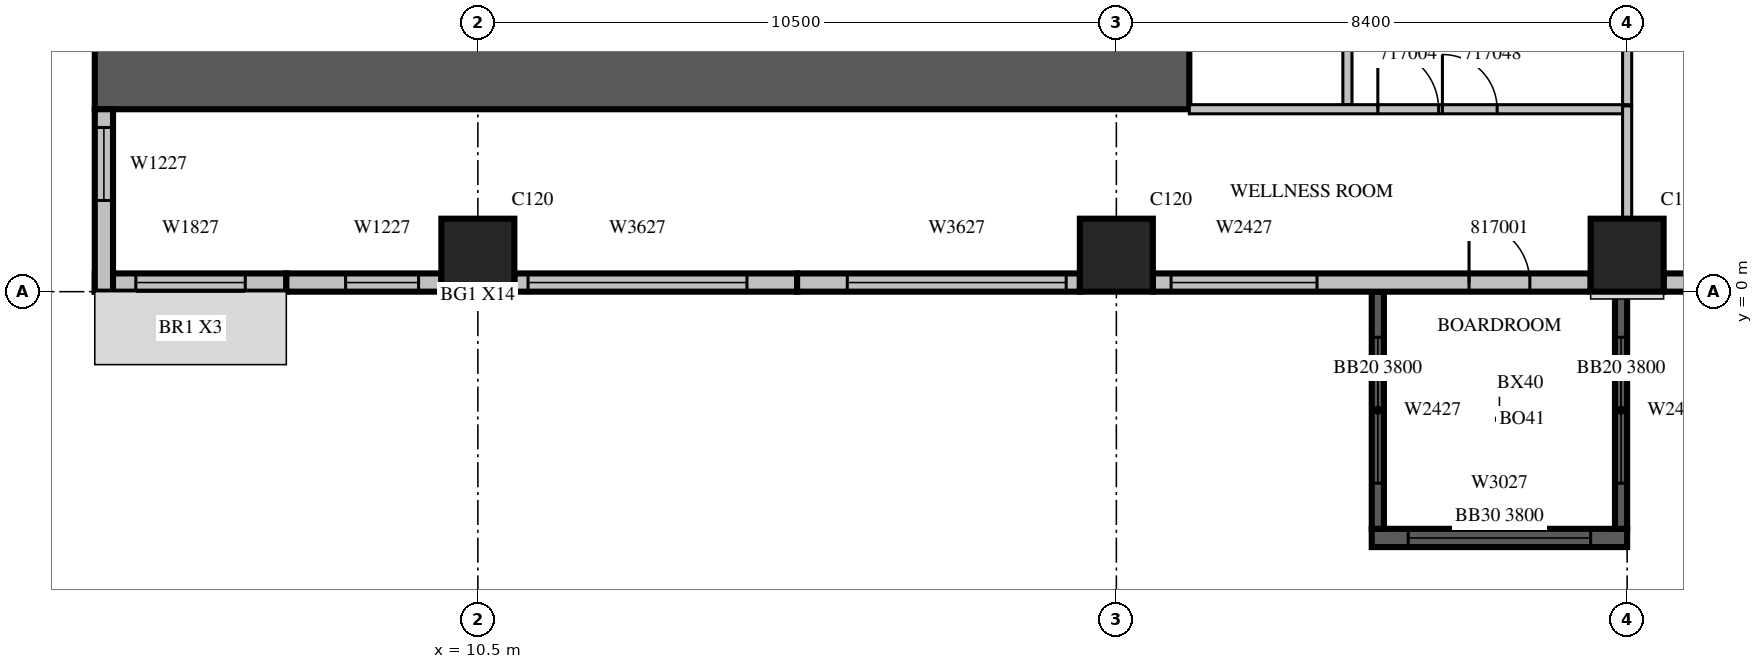
"""IFC4 building model, lengths in metres.
Left out: names, types, materials, properties, quantities, classifications, styles, units other than length and angle.
Written with IfcOpenShell. Run it as: python <this file> out.ifc"""

import sys

from ifc_helpers import new_model, si_unit, direction, frame, frame_2d, origin, origin_2d, place, context, subcontext, project, spatial, rectangle, extrude, source, transform, mapped, element, fill, save


model = new_model("IFC4")
c1 = context("Model", 3, precision=1e-05, world=origin(), true_north=direction((0.0, 1.0)))
c2 = subcontext(c1, "Body", "Model", "MODEL_VIEW")
j1 = project(units=[si_unit("LENGTHUNIT", "METRE"), si_unit("PLANEANGLEUNIT", "RADIAN")], contexts=[c1])
p1 = place(None, origin())
s1 = spatial("IfcSite", under=j1, at=p1, CompositionType="ELEMENT")
p2 = place(p1, origin())
s2 = spatial("IfcBuilding", under=s1, at=p2, CompositionType="ELEMENT")
p3 = place(p2, frame((0.0, 0.0, 82.5)))
s3 = spatial("IfcBuildingStorey", under=s2, at=p3, CompositionType="ELEMENT", Elevation=82.5)
m1 = source(origin(), c2, "Body", "SweptSolid", [
    extrude(rectangle(XDim=1.2, YDim=1.2, at=origin_2d()), origin(), (0.0, 0.0, 1.0), 4.2),
])
for number, where, z_axis, x_axis in (
    (1, (10.5, 0.6, 0.0), (0.0, 0.0, 1.0), (1.0, 0.0, 0.0)),
    (2, (21.0, 0.6, 0.0), (0.0, 0.0, 1.0), (1.0, 0.0, 0.0)),
    (3, (29.4, 0.6, 0.0), (0.0, 0.0, 1.0), (1.0, 0.0, 0.0)),
):
    element("IfcColumn", number, at=place(p3, frame(where, z_axis=z_axis, x_axis=x_axis)), inside=s3, PredefinedType="COLUMN", context=c2, shape_type="MappedRepresentation", body=[
        mapped(m1, transform((0.0, 0.0, 0.0), scale=1.0)),
    ])
m2 = source(origin(), c2, "Body", "SweptSolid", [
    extrude(rectangle(XDim=18.0, YDim=1.2, at=frame_2d((9.0, 0.0))), origin(), (0.0, 0.0, 1.0), 4.2),
])
p4 = place(p3, frame((4.2, 3.6, 0.0), z_axis=(0.0, 0.0, 1.0), x_axis=(1.0, 0.0, 0.0)))
e4 = element("IfcWall", 4, at=p4, inside=s3, PredefinedType="SHEAR", context=c2, shape_type="MappedRepresentation", body=[
    mapped(m2, transform((0.0, 0.0, 0.0), scale=1.0)),
])
m3 = source(origin(), c2, "Body", "SweptSolid", [
    extrude(rectangle(XDim=4.2, YDim=0.3, at=frame_2d((2.1, 0.0))), origin(), (0.0, 0.0, 1.0), 3.8),
])
p5 = place(p3, frame((25.2, -4.05, 0.0), z_axis=(0.0, 0.0, 1.0), x_axis=(1.0, 0.0, 0.0)))
e5 = element("IfcWall", 5, at=p5, inside=s3, PredefinedType="SOLIDWALL", context=c2, shape_type="MappedRepresentation", body=[
    mapped(m3, transform((0.0, 0.0, 0.0), scale=1.0)),
])
m4 = source(origin(), c2, "Body", "SweptSolid", [
    extrude(rectangle(XDim=3.0, YDim=2.7, at=frame_2d((1.5, 1.35))), frame((0.0, 0.16, 0.0), z_axis=(0.0, -1.0, 0.0), x_axis=(1.0, 0.0, 0.0)), (0.0, 0.0, 1.0), 0.32),
])
p6 = place(p5, frame((0.6, 0.0, 0.6)))
e6 = element("IfcOpeningElement", 6, at=p6, cuts=e5, PredefinedType="OPENING", context=c2, shape_type="MappedRepresentation", body=[
    mapped(m4, transform((0.0, 0.0, 0.0), scale=1.0)),
])
m5 = source(origin(), c2, "Body", "SweptSolid", [
    extrude(rectangle(XDim=3.9, YDim=0.2, at=frame_2d((1.95, 0.0))), origin(), (0.0, 0.0, 1.0), 3.8),
])
p7 = place(p3, frame((25.3, 0.0, 0.0), z_axis=(0.0, 0.0, 1.0), x_axis=(0.0, -1.0, 0.0)))
e7 = element("IfcWall", 7, at=p7, inside=s3, PredefinedType="SOLIDWALL", context=c2, shape_type="MappedRepresentation", body=[
    mapped(m5, transform((0.0, 0.0, 0.0), scale=1.0)),
])
m6 = source(origin(), c2, "Body", "SweptSolid", [
    extrude(rectangle(XDim=2.4, YDim=2.7, at=frame_2d((1.2, 1.35))), frame((0.0, 0.11, 0.0), z_axis=(0.0, -1.0, 0.0), x_axis=(1.0, 0.0, 0.0)), (0.0, 0.0, 1.0), 0.22),
])
p8 = place(p7, frame((0.75, 0.0, 0.6)))
e8 = element("IfcOpeningElement", 8, at=p8, cuts=e7, PredefinedType="OPENING", context=c2, shape_type="MappedRepresentation", body=[
    mapped(m6, transform((0.0, 0.0, 0.0), scale=1.0)),
])
p9 = place(p3, frame((29.3, 0.0, 0.0), z_axis=(0.0, 0.0, 1.0), x_axis=(0.0, -1.0, 0.0)))
e9 = element("IfcWall", 9, at=p9, inside=s3, PredefinedType="SOLIDWALL", context=c2, shape_type="MappedRepresentation", body=[
    mapped(m5, transform((0.0, 0.0, 0.0), scale=1.0)),
])
p10 = place(p9, frame((0.75, 0.0, 0.6)))
e10 = element("IfcOpeningElement", 10, at=p10, cuts=e9, PredefinedType="OPENING", context=c2, shape_type="MappedRepresentation", body=[
    mapped(m6, transform((0.0, 0.0, 0.0), scale=1.0)),
])
m7 = source(origin(), c2, "Body", "SweptSolid", [
    extrude(rectangle(XDim=3.15, YDim=0.3, at=frame_2d((1.575, 0.0))), origin(), (0.0, 0.0, 1.0), 3.8),
])
p11 = place(p3, frame((4.2, 0.15, 0.0), z_axis=(0.0, 0.0, 1.0), x_axis=(1.0, 0.0, 0.0)))
e11 = element("IfcWall", 11, at=p11, inside=s3, PredefinedType="STANDARD", context=c2, shape_type="MappedRepresentation", body=[
    mapped(m7, transform((0.0, 0.0, 0.0), scale=1.0)),
])
m8 = source(origin(), c2, "Body", "SweptSolid", [
    extrude(rectangle(XDim=1.8, YDim=2.7, at=frame_2d((0.9, 1.35))), frame((0.0, 0.16, 0.0), z_axis=(0.0, -1.0, 0.0), x_axis=(1.0, 0.0, 0.0)), (0.0, 0.0, 1.0), 0.32),
])
p12 = place(p11, frame((0.675, 0.0, 0.6)))
e12 = element("IfcOpeningElement", 12, at=p12, cuts=e11, PredefinedType="OPENING", context=c2, shape_type="MappedRepresentation", body=[
    mapped(m8, transform((0.0, 0.0, 0.0), scale=1.0)),
])
m9 = source(origin(), c2, "Body", "SweptSolid", [
    extrude(rectangle(XDim=2.55, YDim=0.3, at=frame_2d((1.275, 0.0))), origin(), (0.0, 0.0, 1.0), 3.8),
])
p13 = place(p3, frame((7.35, 0.15, 0.0), z_axis=(0.0, 0.0, 1.0), x_axis=(1.0, 0.0, 0.0)))
e13 = element("IfcWall", 13, at=p13, inside=s3, PredefinedType="STANDARD", context=c2, shape_type="MappedRepresentation", body=[
    mapped(m9, transform((0.0, 0.0, 0.0), scale=1.0)),
])
m10 = source(origin(), c2, "Body", "SweptSolid", [
    extrude(rectangle(XDim=1.2, YDim=2.7, at=frame_2d((0.6, 1.35))), frame((0.0, 0.16, 0.0), z_axis=(0.0, -1.0, 0.0), x_axis=(1.0, 0.0, 0.0)), (0.0, 0.0, 1.0), 0.32),
])
p14 = place(p13, frame((0.975, 0.0, 0.6)))
e14 = element("IfcOpeningElement", 14, at=p14, cuts=e13, PredefinedType="OPENING", context=c2, shape_type="MappedRepresentation", body=[
    mapped(m10, transform((0.0, 0.0, 0.0), scale=1.0)),
])
m11 = source(origin(), c2, "Body", "SweptSolid", [
    extrude(rectangle(XDim=4.65, YDim=0.3, at=frame_2d((2.325, 0.0))), origin(), (0.0, 0.0, 1.0), 3.8),
])
p15 = place(p3, frame((11.1, 0.15, 0.0), z_axis=(0.0, 0.0, 1.0), x_axis=(1.0, 0.0, 0.0)))
e15 = element("IfcWall", 15, at=p15, inside=s3, PredefinedType="STANDARD", context=c2, shape_type="MappedRepresentation", body=[
    mapped(m11, transform((0.0, 0.0, 0.0), scale=1.0)),
])
m12 = source(origin(), c2, "Body", "SweptSolid", [
    extrude(rectangle(XDim=3.6, YDim=2.7, at=frame_2d((1.8, 1.35))), frame((0.0, 0.16, 0.0), z_axis=(0.0, -1.0, 0.0), x_axis=(1.0, 0.0, 0.0)), (0.0, 0.0, 1.0), 0.32),
])
p16 = place(p15, frame((0.225, 0.0, 0.6)))
e16 = element("IfcOpeningElement", 16, at=p16, cuts=e15, PredefinedType="OPENING", context=c2, shape_type="MappedRepresentation", body=[
    mapped(m12, transform((0.0, 0.0, 0.0), scale=1.0)),
])
p17 = place(p3, frame((15.75, 0.15, 0.0), z_axis=(0.0, 0.0, 1.0), x_axis=(1.0, 0.0, 0.0)))
e17 = element("IfcWall", 17, at=p17, inside=s3, PredefinedType="STANDARD", context=c2, shape_type="MappedRepresentation", body=[
    mapped(m11, transform((0.0, 0.0, 0.0), scale=1.0)),
])
p18 = place(p17, frame((0.825, 0.0, 0.6)))
e18 = element("IfcOpeningElement", 18, at=p18, cuts=e17, PredefinedType="OPENING", context=c2, shape_type="MappedRepresentation", body=[
    mapped(m12, transform((0.0, 0.0, 0.0), scale=1.0)),
])
m13 = source(origin(), c2, "Body", "SweptSolid", [
    extrude(rectangle(XDim=7.2, YDim=0.3, at=frame_2d((3.6, 0.0))), origin(), (0.0, 0.0, 1.0), 3.8),
])
p19 = place(p3, frame((21.6, 0.15, 0.0), z_axis=(0.0, 0.0, 1.0), x_axis=(1.0, 0.0, 0.0)))
e19 = element("IfcWall", 19, at=p19, inside=s3, PredefinedType="STANDARD", context=c2, shape_type="MappedRepresentation", body=[
    mapped(m13, transform((0.0, 0.0, 0.0), scale=1.0)),
])
m14 = source(origin(), c2, "Body", "SweptSolid", [
    extrude(rectangle(XDim=2.4, YDim=2.7, at=frame_2d((1.2, 1.35))), frame((0.0, 0.16, 0.0), z_axis=(0.0, -1.0, 0.0), x_axis=(1.0, 0.0, 0.0)), (0.0, 0.0, 1.0), 0.32),
])
p20 = place(p19, frame((0.3, 0.0, 0.6)))
e20 = element("IfcOpeningElement", 20, at=p20, cuts=e19, PredefinedType="OPENING", context=c2, shape_type="MappedRepresentation", body=[
    mapped(m14, transform((0.0, 0.0, 0.0), scale=1.0)),
])
m15 = source(origin(), c2, "Body", "SweptSolid", [
    extrude(rectangle(XDim=1.0, YDim=2.1, at=frame_2d((0.5, 1.05))), frame((0.0, 0.16, 0.0), z_axis=(0.0, -1.0, 0.0), x_axis=(1.0, 0.0, 0.0)), (0.0, 0.0, 1.0), 0.32),
])
p21 = place(p19, frame((5.2, 0.0, 0.0)))
e21 = element("IfcOpeningElement", 21, at=p21, cuts=e19, PredefinedType="OPENING", context=c2, shape_type="MappedRepresentation", body=[
    mapped(m15, transform((0.0, 0.0, 0.0), scale=1.0)),
])
p22 = place(p3, frame((30.0, 0.15, 0.0), z_axis=(0.0, 0.0, 1.0), x_axis=(1.0, 0.0, 0.0)))
e22 = element("IfcWall", 22, at=p22, inside=s3, PredefinedType="STANDARD", context=c2, shape_type="MappedRepresentation", body=[
    mapped(m13, transform((0.0, 0.0, 0.0), scale=1.0)),
])
p23 = place(p22, frame((2.5, 0.0, 0.6)))
e23 = element("IfcOpeningElement", 23, at=p23, cuts=e22, PredefinedType="OPENING", context=c2, shape_type="MappedRepresentation", body=[
    mapped(m14, transform((0.0, 0.0, 0.0), scale=1.0)),
])
m16 = source(origin(), c2, "Body", "SweptSolid", [
    extrude(rectangle(XDim=3.0, YDim=0.3, at=frame_2d((1.5, 0.0))), origin(), (0.0, 0.0, 1.0), 3.8),
])
p24 = place(p3, frame((4.35, 3.0, 0.0), z_axis=(0.0, 0.0, 1.0), x_axis=(0.0, -1.0, 0.0)))
e24 = element("IfcWall", 24, at=p24, inside=s3, PredefinedType="STANDARD", context=c2, shape_type="MappedRepresentation", body=[
    mapped(m16, transform((0.0, 0.0, 0.0), scale=1.0)),
])
p25 = place(p24, frame((0.3, 0.0, 0.6)))
e25 = element("IfcOpeningElement", 25, at=p25, cuts=e24, PredefinedType="OPENING", context=c2, shape_type="MappedRepresentation", body=[
    mapped(m10, transform((0.0, 0.0, 0.0), scale=1.0)),
])
m17 = source(origin(), c2, "Body", "SweptSolid", [
    extrude(rectangle(XDim=11.625, YDim=0.15, at=frame_2d((5.812, 0.0))), origin(), (0.0, 0.0, 1.0), 3.8),
])
p26 = place(p3, frame((24.8, 14.7, 0.0), z_axis=(0.0, 0.0, 1.0), x_axis=(0.0, -1.0, 0.0)))
e26 = element("IfcWall", 26, at=p26, inside=s3, PredefinedType="PARTITIONING", context=c2, shape_type="MappedRepresentation", body=[
    mapped(m17, transform((0.0, 0.0, 0.0), scale=1.0)),
])
m18 = source(origin(), c2, "Body", "SweptSolid", [
    extrude(rectangle(XDim=0.9, YDim=2.1, at=frame_2d((0.45, 1.05))), frame((0.0, 0.085, 0.0), z_axis=(0.0, -1.0, 0.0), x_axis=(1.0, 0.0, 0.0)), (0.0, 0.0, 1.0), 0.17),
])
p27 = place(p26, frame((9.262, 0.0, 0.0)))
e27 = element("IfcOpeningElement", 27, at=p27, cuts=e26, PredefinedType="OPENING", context=c2, shape_type="MappedRepresentation", body=[
    mapped(m18, transform((0.0, 0.0, 0.0), scale=1.0)),
])
p28 = place(p26, frame((2.575, 0.0, 0.0)))
e28 = element("IfcOpeningElement", 28, at=p28, cuts=e26, PredefinedType="OPENING", context=c2, shape_type="MappedRepresentation", body=[
    mapped(m18, transform((0.0, 0.0, 0.0), scale=1.0)),
])
m19 = source(origin(), c2, "Body", "SweptSolid", [
    extrude(rectangle(XDim=6.826, YDim=0.15, at=frame_2d((3.413, 0.0))), origin(), (0.0, 0.0, 1.0), 3.8),
])
p29 = place(p3, frame((29.4, 3.075, 0.0), z_axis=(0.0, 0.0, 1.0), x_axis=(0.0, 1.0, 0.0)))
e29 = element("IfcWall", 29, at=p29, inside=s3, PredefinedType="PARTITIONING", context=c2, shape_type="MappedRepresentation", body=[
    mapped(m19, transform((0.0, 0.0, 0.0), scale=1.0)),
])
m20 = source(origin(), c2, "Body", "SweptSolid", [
    extrude(rectangle(XDim=7.125, YDim=0.15, at=frame_2d((3.562, 0.0))), origin(), (0.0, 0.0, 1.0), 3.8),
])
p30 = place(p3, frame((22.2, 3.0, 0.0), z_axis=(0.0, 0.0, 1.0), x_axis=(1.0, 0.0, 0.0)))
e30 = element("IfcWall", 30, at=p30, inside=s3, PredefinedType="PARTITIONING", context=c2, shape_type="MappedRepresentation", body=[
    mapped(m20, transform((0.0, 0.0, 0.0), scale=1.0)),
])
m21 = source(origin(), c2, "Body", "SweptSolid", [
    extrude(rectangle(XDim=1.0, YDim=2.1, at=frame_2d((0.5, 1.05))), frame((0.0, 0.085, 0.0), z_axis=(0.0, -1.0, 0.0), x_axis=(1.0, 0.0, 0.0)), (0.0, 0.0, 1.0), 0.17),
])
p31 = place(p30, frame((3.1, 0.0, 0.0)))
e31 = element("IfcOpeningElement", 31, at=p31, cuts=e30, PredefinedType="OPENING", context=c2, shape_type="MappedRepresentation", body=[
    mapped(m21, transform((0.0, 0.0, 0.0), scale=1.0)),
])
p32 = place(p30, frame((4.162, 0.0, 0.0)))
e32 = element("IfcOpeningElement", 32, at=p32, cuts=e30, PredefinedType="OPENING", context=c2, shape_type="MappedRepresentation", body=[
    mapped(m18, transform((0.0, 0.0, 0.0), scale=1.0)),
])
m22 = source(origin(), c2, "Body", "SweptSolid", [
    extrude(rectangle(XDim=1.856, YDim=0.15, at=frame_2d((0.928, 0.0))), origin(), (0.0, 0.0, 1.0), 3.8),
])
p33 = place(p3, frame((29.4, 1.199, 0.0), z_axis=(0.0, 0.0, 1.0), x_axis=(0.0, 1.0, 0.0)))
e33 = element("IfcWall", 33, at=p33, inside=s3, PredefinedType="PARTITIONING", context=c2, shape_type="MappedRepresentation", body=[
    mapped(m22, transform((0.0, 0.0, 0.0), scale=1.0)),
])
m23 = source(origin(), c2, "Body", "SweptSolid", [
    extrude(rectangle(XDim=3.0, YDim=2.7, at=frame_2d((1.5, 1.35))), frame((0.0, 0.03, 0.0), z_axis=(0.0, -1.0, 0.0), x_axis=(1.0, 0.0, 0.0)), (0.0, 0.0, 1.0), 0.06),
])
p34 = place(p6, origin())
e34 = element("IfcWindow", 34, at=p34, inside=s3, PartitioningType="SINGLE_PANEL", PredefinedType="WINDOW", context=c2, shape_type="MappedRepresentation", body=[
    mapped(m23, transform((0.0, 0.0, 0.0), scale=1.0)),
])
fill(e6, e34)
m24 = source(origin(), c2, "Body", "SweptSolid", [
    extrude(rectangle(XDim=2.4, YDim=2.7, at=frame_2d((1.2, 1.35))), frame((0.0, 0.03, 0.0), z_axis=(0.0, -1.0, 0.0), x_axis=(1.0, 0.0, 0.0)), (0.0, 0.0, 1.0), 0.06),
])
p35 = place(p8, origin())
e35 = element("IfcWindow", 35, at=p35, inside=s3, PartitioningType="SINGLE_PANEL", PredefinedType="WINDOW", context=c2, shape_type="MappedRepresentation", body=[
    mapped(m24, transform((0.0, 0.0, 0.0), scale=1.0)),
])
fill(e8, e35)
p36 = place(p10, origin())
e36 = element("IfcWindow", 36, at=p36, inside=s3, PartitioningType="SINGLE_PANEL", PredefinedType="WINDOW", context=c2, shape_type="MappedRepresentation", body=[
    mapped(m24, transform((0.0, 0.0, 0.0), scale=1.0)),
])
fill(e10, e36)
m25 = source(origin(), c2, "Body", "SweptSolid", [
    extrude(rectangle(XDim=1.8, YDim=2.7, at=frame_2d((0.9, 1.35))), frame((0.0, 0.03, 0.0), z_axis=(0.0, -1.0, 0.0), x_axis=(1.0, 0.0, 0.0)), (0.0, 0.0, 1.0), 0.06),
])
p37 = place(p12, origin())
e37 = element("IfcWindow", 37, at=p37, inside=s3, PartitioningType="SINGLE_PANEL", PredefinedType="WINDOW", context=c2, shape_type="MappedRepresentation", body=[
    mapped(m25, transform((0.0, 0.0, 0.0), scale=1.0)),
])
fill(e12, e37)
m26 = source(origin(), c2, "Body", "SweptSolid", [
    extrude(rectangle(XDim=1.2, YDim=2.7, at=frame_2d((0.6, 1.35))), frame((0.0, 0.03, 0.0), z_axis=(0.0, -1.0, 0.0), x_axis=(1.0, 0.0, 0.0)), (0.0, 0.0, 1.0), 0.06),
])
p38 = place(p14, origin())
e38 = element("IfcWindow", 38, at=p38, inside=s3, PartitioningType="SINGLE_PANEL", PredefinedType="WINDOW", context=c2, shape_type="MappedRepresentation", body=[
    mapped(m26, transform((0.0, 0.0, 0.0), scale=1.0)),
])
fill(e14, e38)
m27 = source(origin(), c2, "Body", "SweptSolid", [
    extrude(rectangle(XDim=3.6, YDim=2.7, at=frame_2d((1.8, 1.35))), frame((0.0, 0.03, 0.0), z_axis=(0.0, -1.0, 0.0), x_axis=(1.0, 0.0, 0.0)), (0.0, 0.0, 1.0), 0.06),
])
p39 = place(p16, origin())
e39 = element("IfcWindow", 39, at=p39, inside=s3, PartitioningType="SINGLE_PANEL", PredefinedType="WINDOW", context=c2, shape_type="MappedRepresentation", body=[
    mapped(m27, transform((0.0, 0.0, 0.0), scale=1.0)),
])
fill(e16, e39)
p40 = place(p18, origin())
e40 = element("IfcWindow", 40, at=p40, inside=s3, PartitioningType="SINGLE_PANEL", PredefinedType="WINDOW", context=c2, shape_type="MappedRepresentation", body=[
    mapped(m27, transform((0.0, 0.0, 0.0), scale=1.0)),
])
fill(e18, e40)
p41 = place(p20, origin())
e41 = element("IfcWindow", 41, at=p41, inside=s3, PartitioningType="SINGLE_PANEL", PredefinedType="WINDOW", context=c2, shape_type="MappedRepresentation", body=[
    mapped(m24, transform((0.0, 0.0, 0.0), scale=1.0)),
])
fill(e20, e41)
p42 = place(p25, origin())
e42 = element("IfcWindow", 42, at=p42, inside=s3, PartitioningType="SINGLE_PANEL", PredefinedType="WINDOW", context=c2, shape_type="MappedRepresentation", body=[
    mapped(m26, transform((0.0, 0.0, 0.0), scale=1.0)),
])
fill(e25, e42)
m28 = source(origin(), c2, "Body", "SweptSolid", [
    extrude(rectangle(XDim=1.0, YDim=2.1, at=frame_2d((0.5, 1.05))), frame((0.0, 0.025, 0.0), z_axis=(0.0, -1.0, 0.0), x_axis=(1.0, 0.0, 0.0)), (0.0, 0.0, 1.0), 0.05),
])
p43 = place(p31, origin())
e43 = element("IfcDoor", 43, at=p43, inside=s3, OperationType="SINGLE_SWING_LEFT", PredefinedType="DOOR", context=c2, shape_type="MappedRepresentation", body=[
    mapped(m28, transform((0.0, 0.0, 0.0), scale=1.0)),
])
fill(e31, e43)
m29 = source(origin(), c2, "Body", "SweptSolid", [
    extrude(rectangle(XDim=0.9, YDim=2.1, at=frame_2d((0.45, 1.05))), frame((0.0, 0.025, 0.0), z_axis=(0.0, -1.0, 0.0), x_axis=(1.0, 0.0, 0.0)), (0.0, 0.0, 1.0), 0.05),
])
p44 = place(p32, origin())
e44 = element("IfcDoor", 44, at=p44, inside=s3, OperationType="SINGLE_SWING_LEFT", PredefinedType="DOOR", context=c2, shape_type="MappedRepresentation", body=[
    mapped(m29, transform((0.0, 0.0, 0.0), scale=1.0)),
])
fill(e32, e44)
p45 = place(p21, origin())
e45 = element("IfcDoor", 45, at=p45, inside=s3, OperationType="SINGLE_SWING_LEFT", PredefinedType="DOOR", context=c2, shape_type="MappedRepresentation", body=[
    mapped(m28, transform((0.0, 0.0, 0.0), scale=1.0)),
])
fill(e21, e45)
save(model, sys.argv[1])
